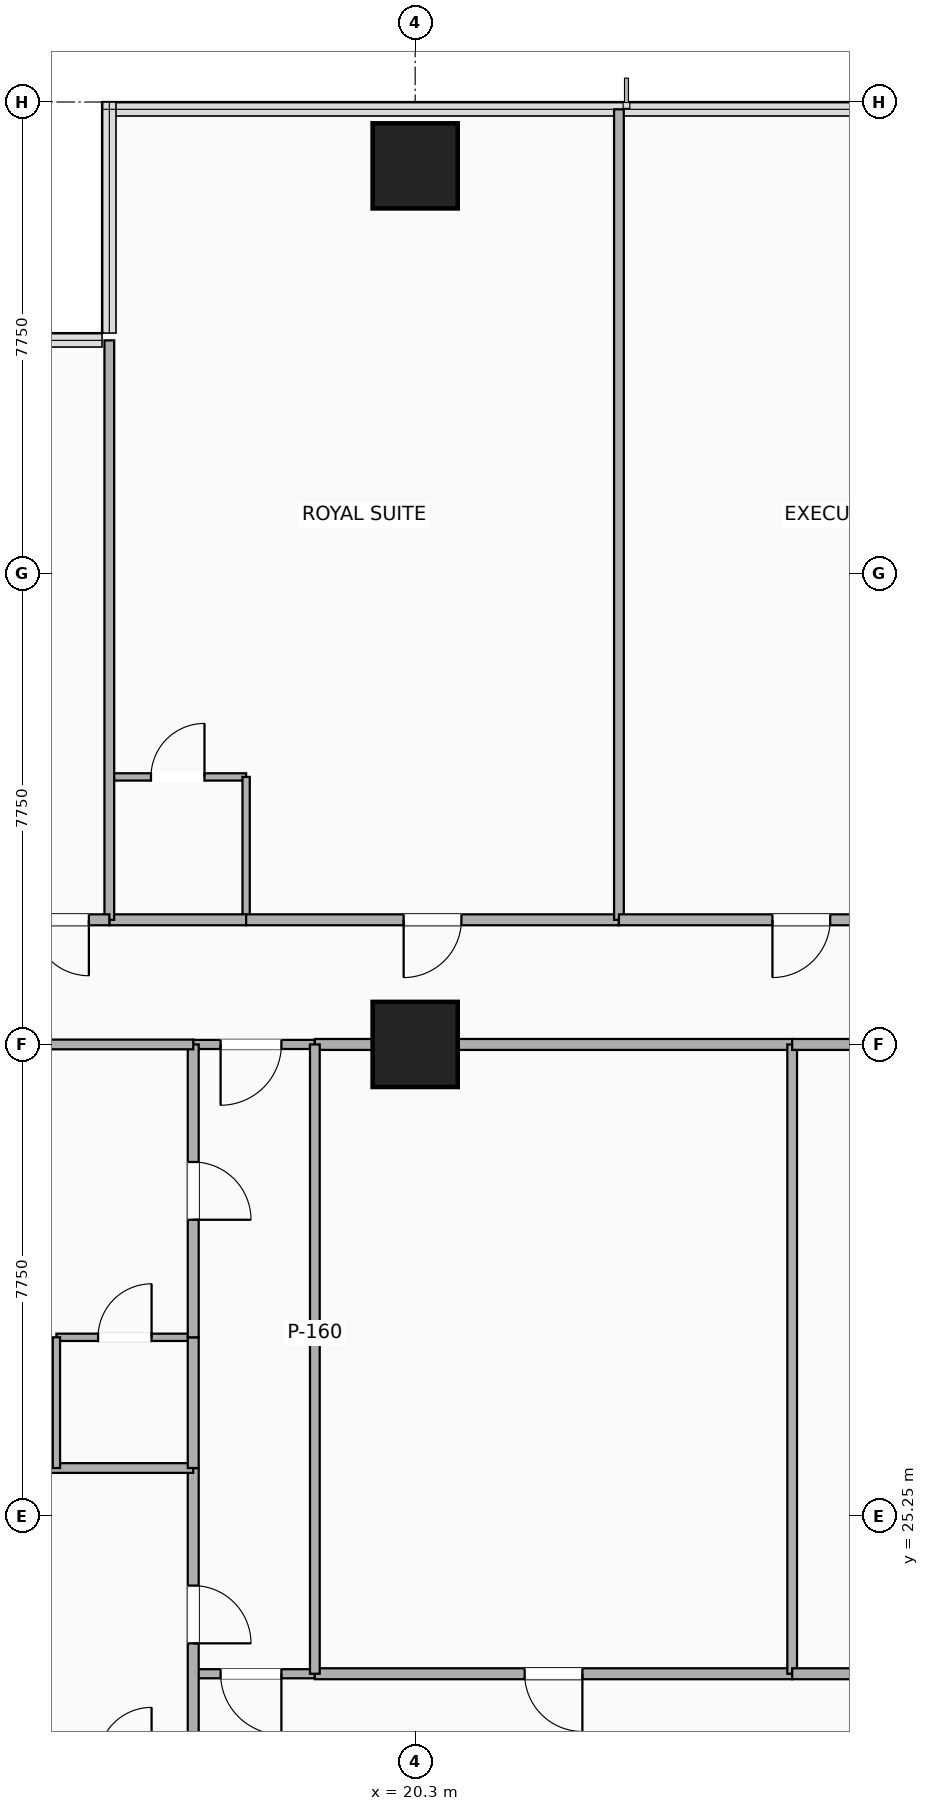
"""IFC4 building model, lengths in metres.
Left out: names, types, materials, properties, quantities, classifications, styles, units other than length and angle.
Written with IfcOpenShell. Run it as: python <this file> out.ifc"""

import sys

from ifc_helpers import new_model, si_unit, direction, frame, frame_2d, origin, origin_2d, place, context, subcontext, project, spatial, rectangle, extrude, element, fill, save


model = new_model("IFC4")
c1 = context("Model", 3, precision=1e-05, world=origin(), true_north=direction((0.0, 1.0)))
c2 = subcontext(c1, "Body", "Model", "MODEL_VIEW")
j1 = project(units=[si_unit("LENGTHUNIT", "METRE"), si_unit("PLANEANGLEUNIT", "RADIAN")], contexts=[c1])
p1 = place(None, origin())
s1 = spatial("IfcSite", under=j1, at=p1, CompositionType="ELEMENT")
p2 = place(p1, origin())
s2 = spatial("IfcBuilding", under=s1, at=p2, CompositionType="ELEMENT")
p3 = place(p2, frame((0.0, 0.0, 71.9)))
s3 = spatial("IfcBuildingStorey", under=s2, at=p3, CompositionType="ELEMENT", Elevation=71.9)
for number, where, z_axis, x_axis in (
    (1, (20.3, 33.0, -0.28), (0.0, 0.0, 1.0), (1.0, 0.0, 0.0)),
    (2, (20.3, 47.45, -0.28), (0.0, 0.0, 1.0), (1.0, 0.0, 0.0)),
):
    element("IfcColumn", number, at=place(p3, frame(where, z_axis=z_axis, x_axis=x_axis)), inside=s3, PredefinedType="COLUMN", context=c2, shape_type="SweptSolid", body=[
        extrude(rectangle(XDim=1.4, YDim=1.4, at=origin_2d()), origin(), (0.0, 0.0, 1.0), 3.46),
    ])
p4 = place(p3, frame((16.65, 22.65, 0.0), z_axis=(0.0, 0.0, 1.0), x_axis=(1.0, 0.0, 0.0)))
e3 = element("IfcWall", 3, at=p4, inside=s3, PredefinedType="PARTITIONING", context=c2, shape_type="SweptSolid", body=[
    extrude(rectangle(XDim=2.0, YDim=0.15, at=frame_2d((1.0, 0.0))), origin(), (0.0, 0.0, 1.0), 3.18),
])
p5 = place(p4, frame((0.45, 0.0, 0.0)))
e4 = element("IfcOpeningElement", 4, at=p5, cuts=e3, PredefinedType="OPENING", context=c2, shape_type="SweptSolid", body=[
    extrude(rectangle(XDim=1.0, YDim=2.15, at=frame_2d((0.5, 1.075))), frame((0.0, 0.085, 0.0), z_axis=(0.0, -1.0, 0.0), x_axis=(1.0, 0.0, 0.0)), (0.0, 0.0, 1.0), 0.17),
])
p6 = place(p3, frame((16.65, 33.0, 0.0), z_axis=(0.0, 0.0, 1.0), x_axis=(1.0, 0.0, 0.0)))
e5 = element("IfcWall", 5, at=p6, inside=s3, PredefinedType="PARTITIONING", context=c2, shape_type="SweptSolid", body=[
    extrude(rectangle(XDim=2.0, YDim=0.15, at=frame_2d((1.0, 0.0))), origin(), (0.0, 0.0, 1.0), 2.47),
])
p7 = place(p6, frame((0.45, 0.0, 0.0)))
e6 = element("IfcOpeningElement", 6, at=p7, cuts=e5, PredefinedType="OPENING", context=c2, shape_type="SweptSolid", body=[
    extrude(rectangle(XDim=1.0, YDim=2.15, at=frame_2d((0.5, 1.075))), frame((0.0, 0.085, 0.0), z_axis=(0.0, -1.0, 0.0), x_axis=(1.0, 0.0, 0.0)), (0.0, 0.0, 1.0), 0.17),
])
p8 = place(p3, frame((18.65, 22.65, 0.0), z_axis=(0.0, 0.0, 1.0), x_axis=(1.0, 0.0, 0.0)))
e7 = element("IfcWall", 7, at=p8, inside=s3, PredefinedType="PARTITIONING", context=c2, shape_type="SweptSolid", body=[
    extrude(rectangle(XDim=7.85, YDim=0.18, at=frame_2d((3.925, 0.0))), origin(), (0.0, 0.0, 1.0), 2.47),
])
p9 = place(p8, frame((3.45, 0.0, 0.0)))
e8 = element("IfcOpeningElement", 8, at=p9, cuts=e7, PredefinedType="OPENING", context=c2, shape_type="SweptSolid", body=[
    extrude(rectangle(XDim=0.95, YDim=2.15, at=frame_2d((0.475, 1.075))), frame((0.0, 0.1, 0.0), z_axis=(0.0, -1.0, 0.0), x_axis=(1.0, 0.0, 0.0)), (0.0, 0.0, 1.0), 0.2),
])
p10 = place(p3, frame((18.65, 33.0, 0.0), z_axis=(0.0, 0.0, 1.0), x_axis=(1.0, 0.0, 0.0)))
e9 = element("IfcWall", 9, at=p10, inside=s3, PredefinedType="PARTITIONING", context=c2, shape_type="SweptSolid", body=[
    extrude(rectangle(XDim=7.85, YDim=0.18, at=frame_2d((3.925, 0.0))), origin(), (0.0, 0.0, 1.0), 2.47),
])
for number, where, z_axis, x_axis in (
    (10, (18.65, 22.65, 0.0), (0.0, 0.0, 1.0), (0.0, 1.0, 0.0)),
    (11, (26.5, 22.65, 0.0), (0.0, 0.0, 1.0), (0.0, 1.0, 0.0)),
):
    element("IfcWall", number, at=place(p3, frame(where, z_axis=z_axis, x_axis=x_axis)), inside=s3, PredefinedType="PARTITIONING", context=c2, shape_type="SweptSolid", body=[
        extrude(rectangle(XDim=10.35, YDim=0.16, at=frame_2d((5.175, 0.0))), origin(), (0.0, 0.0, 1.0), 2.47),
    ])
p11 = place(p3, frame((26.5, 22.65, 0.0), z_axis=(0.0, 0.0, 1.0), x_axis=(1.0, 0.0, 0.0)))
e12 = element("IfcWall", 12, at=p11, inside=s3, PredefinedType="PARTITIONING", context=c2, shape_type="SweptSolid", body=[
    extrude(rectangle(XDim=19.95, YDim=0.18, at=frame_2d((9.975, 0.0))), origin(), (0.0, 0.0, 1.0), 2.47),
])
p12 = place(p11, frame((9.5, 0.0, 0.0)))
e13 = element("IfcOpeningElement", 13, at=p12, cuts=e12, PredefinedType="OPENING", context=c2, shape_type="SweptSolid", body=[
    extrude(rectangle(XDim=0.95, YDim=2.15, at=frame_2d((0.475, 1.075))), frame((0.0, 0.1, 0.0), z_axis=(0.0, -1.0, 0.0), x_axis=(1.0, 0.0, 0.0)), (0.0, 0.0, 1.0), 0.2),
])
p13 = place(p3, frame((26.5, 33.0, 0.0), z_axis=(0.0, 0.0, 1.0), x_axis=(1.0, 0.0, 0.0)))
e14 = element("IfcWall", 14, at=p13, inside=s3, PredefinedType="PARTITIONING", context=c2, shape_type="SweptSolid", body=[
    extrude(rectangle(XDim=19.95, YDim=0.18, at=frame_2d((9.975, 0.0))), origin(), (0.0, 0.0, 1.0), 2.47),
])
p14 = place(p3, frame((15.27, 37.4, 0.0), z_axis=(0.0, 0.0, 1.0), x_axis=(1.0, 0.0, 0.0)))
e15 = element("IfcWall", 15, at=p14, inside=s3, PredefinedType="PARTITIONING", context=c2, shape_type="SweptSolid", body=[
    extrude(rectangle(XDim=2.25, YDim=0.12, at=frame_2d((1.125, 0.0))), origin(), (0.0, 0.0, 1.0), 3.18),
])
p15 = place(p14, frame((1.565, 0.0, 0.0), z_axis=(0.0, 0.0, 1.0), x_axis=(-1.0, 0.0, 0.0)))
e16 = element("IfcOpeningElement", 16, at=p15, cuts=e15, PredefinedType="OPENING", context=c2, shape_type="SweptSolid", body=[
    extrude(rectangle(XDim=0.88, YDim=2.08, at=frame_2d((0.44, 1.04))), frame((0.0, 0.07, 0.0), z_axis=(0.0, -1.0, 0.0), x_axis=(1.0, 0.0, 0.0)), (0.0, 0.0, 1.0), 0.14),
])
p16 = place(p3, frame((17.52, 35.05, 0.0), z_axis=(0.0, 0.0, 1.0), x_axis=(0.0, 1.0, 0.0)))
e17 = element("IfcWall", 17, at=p16, inside=s3, PredefinedType="PARTITIONING", context=c2, shape_type="SweptSolid", body=[
    extrude(rectangle(XDim=2.35, YDim=0.12, at=frame_2d((1.175, 0.0))), origin(), (0.0, 0.0, 1.0), 3.18),
])
p17 = place(p3, frame((15.27, 35.05, 0.0), z_axis=(0.0, 0.0, 1.0), x_axis=(1.0, 0.0, 0.0)))
e18 = element("IfcWall", 18, at=p17, inside=s3, PredefinedType="PARTITIONING", context=c2, shape_type="SweptSolid", body=[
    extrude(rectangle(XDim=2.25, YDim=0.18, at=frame_2d((1.125, 0.0))), origin(), (0.0, 0.0, 1.0), 3.18),
])
p18 = place(p3, frame((17.52, 35.05, 0.0), z_axis=(0.0, 0.0, 1.0), x_axis=(1.0, 0.0, 0.0)))
e19 = element("IfcWall", 19, at=p18, inside=s3, PredefinedType="PARTITIONING", context=c2, shape_type="SweptSolid", body=[
    extrude(rectangle(XDim=6.131, YDim=0.18, at=frame_2d((3.065, 0.0))), origin(), (0.0, 0.0, 1.0), 2.47),
])
p19 = place(p18, frame((2.591, 0.0, 0.0)))
e20 = element("IfcOpeningElement", 20, at=p19, cuts=e19, PredefinedType="OPENING", context=c2, shape_type="SweptSolid", body=[
    extrude(rectangle(XDim=0.95, YDim=2.15, at=frame_2d((0.475, 1.075))), frame((0.0, 0.1, 0.0), z_axis=(0.0, -1.0, 0.0), x_axis=(1.0, 0.0, 0.0)), (0.0, 0.0, 1.0), 0.2),
])
p20 = place(p3, frame((15.27, 35.05, 0.0), z_axis=(0.0, 0.0, 1.0), x_axis=(0.0, 1.0, 0.0)))
e21 = element("IfcWall", 21, at=p20, inside=s3, PredefinedType="PARTITIONING", context=c2, shape_type="SweptSolid", body=[
    extrude(rectangle(XDim=9.53, YDim=0.16, at=frame_2d((4.765, 0.0))), origin(), (0.0, 0.0, 1.0), 3.18),
])
p21 = place(p3, frame((23.651, 35.05, 0.0), z_axis=(0.0, 0.0, 1.0), x_axis=(0.0, 1.0, 0.0)))
e22 = element("IfcWall", 22, at=p21, inside=s3, PredefinedType="PARTITIONING", context=c2, shape_type="SweptSolid", body=[
    extrude(rectangle(XDim=13.33, YDim=0.16, at=frame_2d((6.665, 0.0))), origin(), (0.0, 0.0, 1.0), 2.543),
])
p22 = place(p3, frame((23.651, 35.05, 0.0), z_axis=(0.0, 0.0, 1.0), x_axis=(1.0, 0.0, 0.0)))
e23 = element("IfcWall", 23, at=p22, inside=s3, PredefinedType="PARTITIONING", context=c2, shape_type="SweptSolid", body=[
    extrude(rectangle(XDim=5.999, YDim=0.18, at=frame_2d((3.0, 0.0))), origin(), (0.0, 0.0, 1.0), 2.47),
])
p23 = place(p22, frame((2.524, 0.0, 0.0)))
e24 = element("IfcOpeningElement", 24, at=p23, cuts=e23, PredefinedType="OPENING", context=c2, shape_type="SweptSolid", body=[
    extrude(rectangle(XDim=0.95, YDim=2.15, at=frame_2d((0.475, 1.075))), frame((0.0, 0.1, 0.0), z_axis=(0.0, -1.0, 0.0), x_axis=(1.0, 0.0, 0.0)), (0.0, 0.0, 1.0), 0.2),
])
p24 = place(p3, frame((16.65, 21.217, 0.0), z_axis=(0.0, 0.0, 1.0), x_axis=(0.0, 1.0, 0.0)))
e25 = element("IfcWall", 25, at=p24, inside=s3, PredefinedType="PARTITIONING", context=c2, shape_type="SweptSolid", body=[
    extrude(rectangle(XDim=4.816, YDim=0.18, at=frame_2d((2.408, 0.0))), origin(), (0.0, 0.0, 1.0), 2.748),
])
p25 = place(p24, frame((1.933, 0.0, 0.0)))
e26 = element("IfcOpeningElement", 26, at=p25, cuts=e25, PredefinedType="OPENING", context=c2, shape_type="SweptSolid", body=[
    extrude(rectangle(XDim=0.95, YDim=2.15, at=frame_2d((0.475, 1.075))), frame((0.0, 0.1, 0.0), z_axis=(0.0, -1.0, 0.0), x_axis=(1.0, 0.0, 0.0)), (0.0, 0.0, 1.0), 0.2),
])
p26 = place(p3, frame((11.47, 26.033, 0.0), z_axis=(0.0, 0.0, 1.0), x_axis=(1.0, 0.0, 0.0)))
e27 = element("IfcWall", 27, at=p26, inside=s3, PredefinedType="PARTITIONING", context=c2, shape_type="SweptSolid", body=[
    extrude(rectangle(XDim=5.18, YDim=0.16, at=frame_2d((2.59, 0.0))), origin(), (0.0, 0.0, 1.0), 2.543),
])
p27 = place(p3, frame((14.4, 28.183, 0.0), z_axis=(0.0, 0.0, 1.0), x_axis=(1.0, 0.0, 0.0)))
e28 = element("IfcWall", 28, at=p27, inside=s3, PredefinedType="PARTITIONING", context=c2, shape_type="SweptSolid", body=[
    extrude(rectangle(XDim=2.25, YDim=0.12, at=frame_2d((1.125, 0.0))), origin(), (0.0, 0.0, 1.0), 3.18),
])
p28 = place(p27, frame((1.565, 0.0, 0.0), z_axis=(0.0, 0.0, 1.0), x_axis=(-1.0, 0.0, 0.0)))
e29 = element("IfcOpeningElement", 29, at=p28, cuts=e28, PredefinedType="OPENING", context=c2, shape_type="SweptSolid", body=[
    extrude(rectangle(XDim=0.88, YDim=2.08, at=frame_2d((0.44, 1.04))), frame((0.0, 0.07, 0.0), z_axis=(0.0, -1.0, 0.0), x_axis=(1.0, 0.0, 0.0)), (0.0, 0.0, 1.0), 0.14),
])
p29 = place(p3, frame((14.4, 26.033, 0.0), z_axis=(0.0, 0.0, 1.0), x_axis=(0.0, 1.0, 0.0)))
e30 = element("IfcWall", 30, at=p29, inside=s3, PredefinedType="PARTITIONING", context=c2, shape_type="SweptSolid", body=[
    extrude(rectangle(XDim=2.15, YDim=0.12, at=frame_2d((1.075, 0.0))), origin(), (0.0, 0.0, 1.0), 3.18),
])
p30 = place(p3, frame((16.65, 26.033, 0.0), z_axis=(0.0, 0.0, 1.0), x_axis=(0.0, 1.0, 0.0)))
e31 = element("IfcWall", 31, at=p30, inside=s3, PredefinedType="PARTITIONING", context=c2, shape_type="SweptSolid", body=[
    extrude(rectangle(XDim=2.15, YDim=0.18, at=frame_2d((1.075, 0.0))), origin(), (0.0, 0.0, 1.0), 3.18),
])
p31 = place(p3, frame((16.65, 28.183, 0.0), z_axis=(0.0, 0.0, 1.0), x_axis=(0.0, 1.0, 0.0)))
e32 = element("IfcWall", 32, at=p31, inside=s3, PredefinedType="PARTITIONING", context=c2, shape_type="SweptSolid", body=[
    extrude(rectangle(XDim=4.817, YDim=0.18, at=frame_2d((2.408, 0.0))), origin(), (0.0, 0.0, 1.0), 2.47),
])
p32 = place(p31, frame((1.933, 0.0, 0.0)))
e33 = element("IfcOpeningElement", 33, at=p32, cuts=e32, PredefinedType="OPENING", context=c2, shape_type="SweptSolid", body=[
    extrude(rectangle(XDim=0.95, YDim=2.15, at=frame_2d((0.475, 1.075))), frame((0.0, 0.1, 0.0), z_axis=(0.0, -1.0, 0.0), x_axis=(1.0, 0.0, 0.0)), (0.0, 0.0, 1.0), 0.2),
])
p33 = place(p3, frame((11.47, 33.0, 0.0), z_axis=(0.0, 0.0, 1.0), x_axis=(1.0, 0.0, 0.0)))
e34 = element("IfcWall", 34, at=p33, inside=s3, PredefinedType="PARTITIONING", context=c2, shape_type="SweptSolid", body=[
    extrude(rectangle(XDim=5.18, YDim=0.16, at=frame_2d((2.59, 0.0))), origin(), (0.0, 0.0, 1.0), 2.47),
])
p34 = place(p3, frame((11.47, 35.05, 0.0), z_axis=(0.0, 0.0, 1.0), x_axis=(1.0, 0.0, 0.0)))
e35 = element("IfcWall", 35, at=p34, inside=s3, PredefinedType="PARTITIONING", context=c2, shape_type="SweptSolid", body=[
    extrude(rectangle(XDim=3.8, YDim=0.18, at=frame_2d((1.9, 0.0))), origin(), (0.0, 0.0, 1.0), 3.18),
])
p35 = place(p34, frame((2.544, 0.0, 0.0)))
e36 = element("IfcOpeningElement", 36, at=p35, cuts=e35, PredefinedType="OPENING", context=c2, shape_type="SweptSolid", body=[
    extrude(rectangle(XDim=0.92, YDim=2.08, at=frame_2d((0.46, 1.04))), frame((0.0, 0.1, 0.0), z_axis=(0.0, -1.0, 0.0), x_axis=(1.0, 0.0, 0.0)), (0.0, 0.0, 1.0), 0.2),
])
p36 = place(p5, origin())
e37 = element("IfcDoor", 37, at=p36, inside=s3, OperationType="SINGLE_SWING_RIGHT", PredefinedType="DOOR", context=c2, shape_type="SweptSolid", body=[
    extrude(rectangle(XDim=1.0, YDim=2.15, at=frame_2d((0.5, 1.075))), frame((0.0, 0.025, 0.0), z_axis=(0.0, -1.0, 0.0), x_axis=(1.0, 0.0, 0.0)), (0.0, 0.0, 1.0), 0.05),
])
fill(e4, e37)
p37 = place(p7, origin())
e38 = element("IfcDoor", 38, at=p37, inside=s3, OperationType="SINGLE_SWING_LEFT", PredefinedType="DOOR", context=c2, shape_type="SweptSolid", body=[
    extrude(rectangle(XDim=1.0, YDim=2.15, at=frame_2d((0.5, 1.075))), frame((0.0, 0.025, 0.0), z_axis=(0.0, -1.0, 0.0), x_axis=(1.0, 0.0, 0.0)), (0.0, 0.0, 1.0), 0.05),
])
fill(e6, e38)
p38 = place(p9, origin())
e39 = element("IfcDoor", 39, at=p38, inside=s3, OperationType="SINGLE_SWING_RIGHT", PredefinedType="DOOR", context=c2, shape_type="SweptSolid", body=[
    extrude(rectangle(XDim=0.95, YDim=2.15, at=frame_2d((0.475, 1.075))), frame((0.0, 0.025, 0.0), z_axis=(0.0, -1.0, 0.0), x_axis=(1.0, 0.0, 0.0)), (0.0, 0.0, 1.0), 0.05),
])
fill(e8, e39)
p39 = place(p15, origin())
e40 = element("IfcDoor", 40, at=p39, inside=s3, OperationType="SINGLE_SWING_RIGHT", PredefinedType="DOOR", context=c2, shape_type="SweptSolid", body=[
    extrude(rectangle(XDim=0.88, YDim=2.08, at=frame_2d((0.44, 1.04))), frame((0.0, 0.025, 0.0), z_axis=(0.0, -1.0, 0.0), x_axis=(1.0, 0.0, 0.0)), (0.0, 0.0, 1.0), 0.05),
])
fill(e16, e40)
p40 = place(p19, origin())
e41 = element("IfcDoor", 41, at=p40, inside=s3, OperationType="SINGLE_SWING_LEFT", PredefinedType="DOOR", context=c2, shape_type="SweptSolid", body=[
    extrude(rectangle(XDim=0.95, YDim=2.15, at=frame_2d((0.475, 1.075))), frame((0.0, 0.025, 0.0), z_axis=(0.0, -1.0, 0.0), x_axis=(1.0, 0.0, 0.0)), (0.0, 0.0, 1.0), 0.05),
])
fill(e20, e41)
p41 = place(p23, origin())
e42 = element("IfcDoor", 42, at=p41, inside=s3, OperationType="SINGLE_SWING_LEFT", PredefinedType="DOOR", context=c2, shape_type="SweptSolid", body=[
    extrude(rectangle(XDim=0.95, YDim=2.15, at=frame_2d((0.475, 1.075))), frame((0.0, 0.025, 0.0), z_axis=(0.0, -1.0, 0.0), x_axis=(1.0, 0.0, 0.0)), (0.0, 0.0, 1.0), 0.05),
])
fill(e24, e42)
p42 = place(p25, origin())
e43 = element("IfcDoor", 43, at=p42, inside=s3, OperationType="SINGLE_SWING_LEFT", PredefinedType="DOOR", context=c2, shape_type="SweptSolid", body=[
    extrude(rectangle(XDim=0.95, YDim=2.15, at=frame_2d((0.475, 1.075))), frame((0.0, 0.025, 0.0), z_axis=(0.0, -1.0, 0.0), x_axis=(1.0, 0.0, 0.0)), (0.0, 0.0, 1.0), 0.05),
])
fill(e26, e43)
p43 = place(p28, origin())
e44 = element("IfcDoor", 44, at=p43, inside=s3, OperationType="SINGLE_SWING_RIGHT", PredefinedType="DOOR", context=c2, shape_type="SweptSolid", body=[
    extrude(rectangle(XDim=0.88, YDim=2.08, at=frame_2d((0.44, 1.04))), frame((0.0, 0.025, 0.0), z_axis=(0.0, -1.0, 0.0), x_axis=(1.0, 0.0, 0.0)), (0.0, 0.0, 1.0), 0.05),
])
fill(e29, e44)
p44 = place(p32, origin())
e45 = element("IfcDoor", 45, at=p44, inside=s3, OperationType="SINGLE_SWING_LEFT", PredefinedType="DOOR", context=c2, shape_type="SweptSolid", body=[
    extrude(rectangle(XDim=0.95, YDim=2.15, at=frame_2d((0.475, 1.075))), frame((0.0, 0.025, 0.0), z_axis=(0.0, -1.0, 0.0), x_axis=(1.0, 0.0, 0.0)), (0.0, 0.0, 1.0), 0.05),
])
fill(e33, e45)
p45 = place(p35, origin())
e46 = element("IfcDoor", 46, at=p45, inside=s3, OperationType="SINGLE_SWING_RIGHT", PredefinedType="DOOR", context=c2, shape_type="SweptSolid", body=[
    extrude(rectangle(XDim=0.92, YDim=2.08, at=frame_2d((0.46, 1.04))), frame((0.0, 0.025, 0.0), z_axis=(0.0, -1.0, 0.0), x_axis=(1.0, 0.0, 0.0)), (0.0, 0.0, 1.0), 0.05),
])
fill(e36, e46)
save(model, sys.argv[1])
